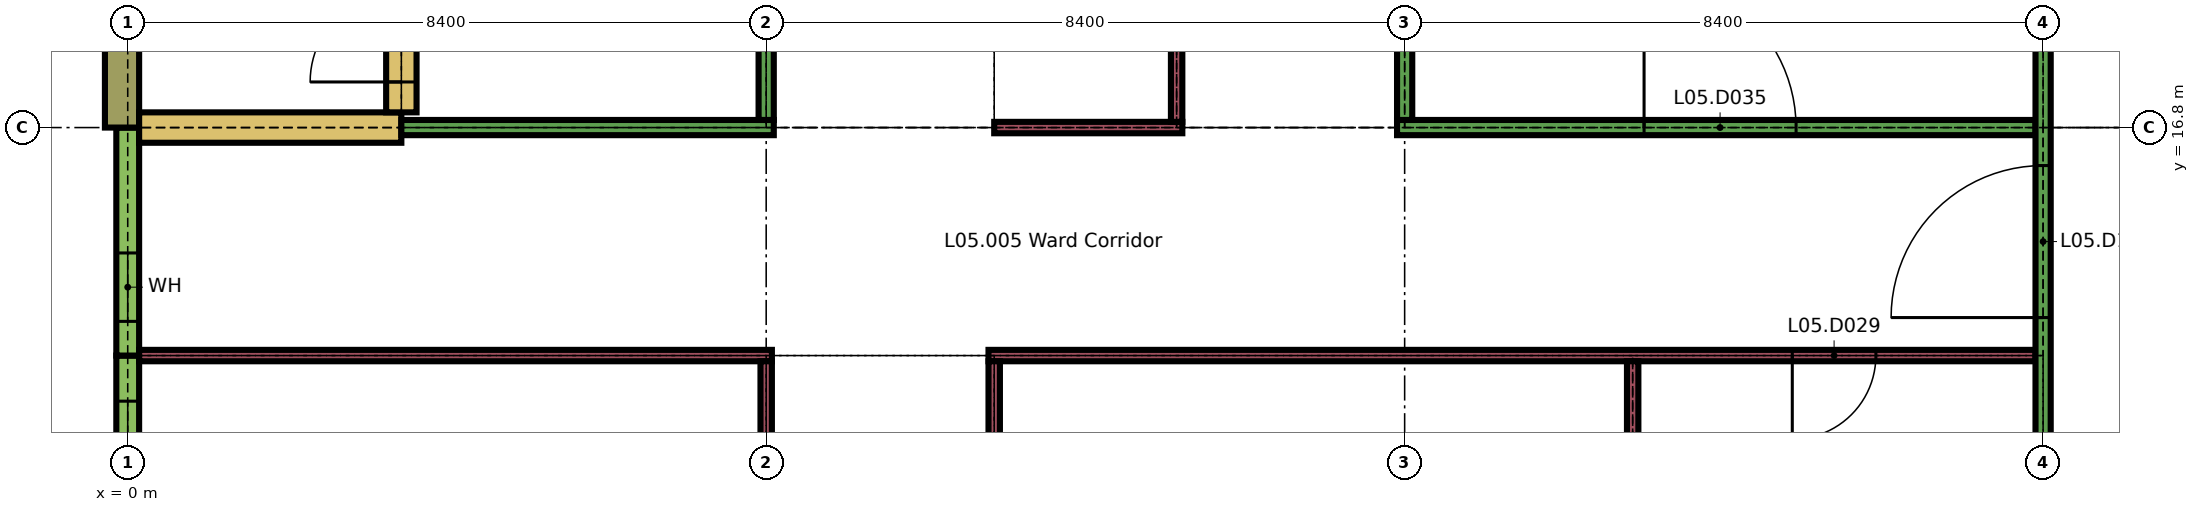
"""IFC4 building model, lengths in metres.
Left out: names, types, materials, properties, quantities, classifications, styles, units other than length and angle.
Written with IfcOpenShell. Run it as: python <this file> out.ifc"""

import sys

from ifc_helpers import new_model, si_unit, direction, frame, frame_2d, origin, place, context, subcontext, project, spatial, rectangle, extrude, element, fill, save


model = new_model("IFC4")
c1 = context("Model", 3, precision=1e-05, world=origin(), true_north=direction((0.0, 1.0)))
c2 = subcontext(c1, "Body", "Model", "MODEL_VIEW")
j1 = project(units=[si_unit("LENGTHUNIT", "METRE"), si_unit("PLANEANGLEUNIT", "RADIAN")], contexts=[c1])
p1 = place(None, origin())
s1 = spatial("IfcSite", under=j1, at=p1, CompositionType="ELEMENT")
p2 = place(p1, origin())
s2 = spatial("IfcBuilding", under=s1, at=p2, CompositionType="ELEMENT")
p3 = place(p2, frame((0.0, 0.0, 22.5)))
s3 = spatial("IfcBuildingStorey", under=s2, at=p3, CompositionType="ELEMENT", Elevation=22.5)
p4 = place(p3, frame((0.0, 11.4, 0.0), z_axis=(0.0, 0.0, 1.0), x_axis=(0.0, 1.0, 0.0)))
e1 = element("IfcWall", 1, at=p4, inside=s3, PredefinedType="SOLIDWALL", context=c2, shape_type="SweptSolid", body=[
    extrude(rectangle(XDim=2.4, YDim=0.3, at=frame_2d((1.2, 0.0))), origin(), (0.0, 0.0, 1.0), 2.96),
])
p5 = place(p4, frame((0.6, 0.0, 0.9)))
e2 = element("IfcOpeningElement", 2, at=p5, cuts=e1, PredefinedType="OPENING", context=c2, shape_type="SweptSolid", body=[
    extrude(rectangle(XDim=1.2, YDim=1.5, at=frame_2d((0.6, 0.75))), frame((0.0, 0.16, 0.0), z_axis=(0.0, -1.0, 0.0), x_axis=(1.0, 0.0, 0.0)), (0.0, 0.0, 1.0), 0.32),
])
p6 = place(p3, frame((0.0, 13.8, 0.0), z_axis=(0.0, 0.0, 1.0), x_axis=(0.0, 1.0, 0.0)))
e3 = element("IfcWall", 3, at=p6, inside=s3, PredefinedType="SOLIDWALL", context=c2, shape_type="SweptSolid", body=[
    extrude(rectangle(XDim=3.0, YDim=0.3, at=frame_2d((1.5, 0.0))), origin(), (0.0, 0.0, 1.0), 2.96),
])
p7 = place(p6, frame((0.45, 0.0, 0.9)))
e4 = element("IfcOpeningElement", 4, at=p7, cuts=e3, PredefinedType="OPENING", context=c2, shape_type="SweptSolid", body=[
    extrude(rectangle(XDim=0.9, YDim=1.5, at=frame_2d((0.45, 0.75))), frame((0.0, 0.16, 0.0), z_axis=(0.0, -1.0, 0.0), x_axis=(1.0, 0.0, 0.0)), (0.0, 0.0, 1.0), 0.32),
])
p8 = place(p3, frame((-0.075, 16.8, 0.0), z_axis=(0.0, 0.0, 1.0), x_axis=(0.0, 1.0, 0.0)))
e5 = element("IfcWall", 5, at=p8, inside=s3, PredefinedType="SOLIDWALL", context=c2, shape_type="SweptSolid", body=[
    extrude(rectangle(XDim=3.15, YDim=0.45, at=frame_2d((1.575, 0.0))), origin(), (0.0, 0.0, 1.0), 3.26),
])
p9 = place(p3, frame((0.15, 13.8, 0.0), z_axis=(0.0, 0.0, 1.0), x_axis=(1.0, 0.0, 0.0)))
e6 = element("IfcWall", 6, at=p9, inside=s3, PredefinedType="PARTITIONING", context=c2, shape_type="SweptSolid", body=[
    extrude(rectangle(XDim=8.325, YDim=0.15, at=frame_2d((4.163, 0.0))), origin(), (0.0, 0.0, 1.0), 3.26),
])
p10 = place(p3, frame((11.325, 13.8, 0.0), z_axis=(0.0, 0.0, 1.0), x_axis=(1.0, 0.0, 0.0)))
e7 = element("IfcWall", 7, at=p10, inside=s3, PredefinedType="PARTITIONING", context=c2, shape_type="SweptSolid", body=[
    extrude(rectangle(XDim=13.775, YDim=0.15, at=frame_2d((6.888, 0.0))), origin(), (0.0, 0.0, 1.0), 3.26),
])
p11 = place(p10, frame((10.575, 0.0, 0.0)))
e8 = element("IfcOpeningElement", 8, at=p11, cuts=e7, PredefinedType="OPENING", context=c2, shape_type="SweptSolid", body=[
    extrude(rectangle(XDim=1.1, YDim=2.1, at=frame_2d((0.55, 1.05))), frame((0.0, 0.085, 0.0), z_axis=(0.0, -1.0, 0.0), x_axis=(1.0, 0.0, 0.0)), (0.0, 0.0, 1.0), 0.17),
])
p12 = place(p3, frame((0.15, 16.8, 0.0), z_axis=(0.0, 0.0, 1.0), x_axis=(1.0, 0.0, 0.0)))
e9 = element("IfcWall", 9, at=p12, inside=s3, PredefinedType="SHEAR", context=c2, shape_type="SweptSolid", body=[
    extrude(rectangle(XDim=3.45, YDim=0.4, at=frame_2d((1.725, 0.0))), origin(), (0.0, 0.0, 1.0), 3.26),
])
p13 = place(p3, frame((3.6, 16.8, 0.0), z_axis=(0.0, 0.0, 1.0), x_axis=(1.0, 0.0, 0.0)))
e10 = element("IfcWall", 10, at=p13, inside=s3, PredefinedType="PARTITIONING", context=c2, shape_type="SweptSolid", body=[
    extrude(rectangle(XDim=4.9, YDim=0.2, at=frame_2d((2.45, 0.0))), origin(), (0.0, 0.0, 1.0), 3.26),
])
p14 = place(p3, frame((11.4, 16.8, 0.0), z_axis=(0.0, 0.0, 1.0), x_axis=(1.0, 0.0, 0.0)))
e11 = element("IfcWall", 11, at=p14, inside=s3, PredefinedType="PARTITIONING", context=c2, shape_type="SweptSolid", body=[
    extrude(rectangle(XDim=2.475, YDim=0.15, at=frame_2d((1.238, 0.0))), origin(), (0.0, 0.0, 1.0), 3.26),
])
p15 = place(p3, frame((16.7, 16.8, 0.0), z_axis=(0.0, 0.0, 1.0), x_axis=(1.0, 0.0, 0.0)))
e12 = element("IfcWall", 12, at=p15, inside=s3, PredefinedType="PARTITIONING", context=c2, shape_type="SweptSolid", body=[
    extrude(rectangle(XDim=8.4, YDim=0.2, at=frame_2d((4.2, 0.0))), origin(), (0.0, 0.0, 1.0), 3.26),
])
p16 = place(p15, frame((3.25, 0.0, 0.0)))
e13 = element("IfcOpeningElement", 13, at=p16, cuts=e12, PredefinedType="OPENING", context=c2, shape_type="SweptSolid", body=[
    extrude(rectangle(XDim=2.0, YDim=2.4, at=frame_2d((1.0, 1.2))), frame((0.0, 0.11, 0.0), z_axis=(0.0, -1.0, 0.0), x_axis=(1.0, 0.0, 0.0)), (0.0, 0.0, 1.0), 0.22),
])
p17 = place(p3, frame((3.6, 17.0, 0.0), z_axis=(0.0, 0.0, 1.0), x_axis=(0.0, 1.0, 0.0)))
e14 = element("IfcWall", 14, at=p17, inside=s3, PredefinedType="SHEAR", context=c2, shape_type="SweptSolid", body=[
    extrude(rectangle(XDim=8.0, YDim=0.4, at=frame_2d((4.0, 0.0))), origin(), (0.0, 0.0, 1.0), 3.26),
])
p18 = place(p17, frame((0.4, 0.0, 0.0)))
e15 = element("IfcOpeningElement", 15, at=p18, cuts=e14, PredefinedType="OPENING", context=c2, shape_type="SweptSolid", body=[
    extrude(rectangle(XDim=1.2, YDim=2.1, at=frame_2d((0.6, 1.05))), frame((0.0, 0.21, 0.0), z_axis=(0.0, -1.0, 0.0), x_axis=(1.0, 0.0, 0.0)), (0.0, 0.0, 1.0), 0.42),
])
p19 = place(p3, frame((8.4, 11.4, 0.0), z_axis=(0.0, 0.0, 1.0), x_axis=(0.0, 1.0, 0.0)))
e16 = element("IfcWall", 16, at=p19, inside=s3, PredefinedType="PARTITIONING", context=c2, shape_type="SweptSolid", body=[
    extrude(rectangle(XDim=2.325, YDim=0.15, at=frame_2d((1.163, 0.0))), origin(), (0.0, 0.0, 1.0), 3.26),
])
p20 = place(p3, frame((8.4, 16.9, 0.0), z_axis=(0.0, 0.0, 1.0), x_axis=(0.0, 1.0, 0.0)))
e17 = element("IfcWall", 17, at=p20, inside=s3, PredefinedType="PARTITIONING", context=c2, shape_type="SweptSolid", body=[
    extrude(rectangle(XDim=8.3, YDim=0.2, at=frame_2d((4.15, 0.0))), origin(), (0.0, 0.0, 1.0), 3.26),
])
p21 = place(p20, frame((3.15, 0.0, 0.0)))
e18 = element("IfcOpeningElement", 18, at=p21, cuts=e17, PredefinedType="OPENING", context=c2, shape_type="SweptSolid", body=[
    extrude(rectangle(XDim=2.0, YDim=2.4, at=frame_2d((1.0, 1.2))), frame((0.0, 0.11, 0.0), z_axis=(0.0, -1.0, 0.0), x_axis=(1.0, 0.0, 0.0)), (0.0, 0.0, 1.0), 0.22),
])
p22 = place(p3, frame((11.4, 11.4, 0.0), z_axis=(0.0, 0.0, 1.0), x_axis=(0.0, 1.0, 0.0)))
e19 = element("IfcWall", 19, at=p22, inside=s3, PredefinedType="PARTITIONING", context=c2, shape_type="SweptSolid", body=[
    extrude(rectangle(XDim=2.325, YDim=0.15, at=frame_2d((1.163, 0.0))), origin(), (0.0, 0.0, 1.0), 3.26),
])
p23 = place(p3, frame((13.8, 16.875, 0.0), z_axis=(0.0, 0.0, 1.0), x_axis=(0.0, 1.0, 0.0)))
e20 = element("IfcWall", 20, at=p23, inside=s3, PredefinedType="PARTITIONING", context=c2, shape_type="SweptSolid", body=[
    extrude(rectangle(XDim=16.625, YDim=0.15, at=frame_2d((8.312, 0.0))), origin(), (0.0, 0.0, 1.0), 3.26),
])
p24 = place(p23, frame((13.275, 0.0, 0.0)))
e21 = element("IfcOpeningElement", 21, at=p24, cuts=e20, PredefinedType="OPENING", context=c2, shape_type="SweptSolid", body=[
    extrude(rectangle(XDim=1.2, YDim=2.1, at=frame_2d((0.6, 1.05))), frame((0.0, 0.085, 0.0), z_axis=(0.0, -1.0, 0.0), x_axis=(1.0, 0.0, 0.0)), (0.0, 0.0, 1.0), 0.17),
])
p25 = place(p3, frame((16.8, 16.9, 0.0), z_axis=(0.0, 0.0, 1.0), x_axis=(0.0, 1.0, 0.0)))
e22 = element("IfcWall", 22, at=p25, inside=s3, PredefinedType="PARTITIONING", context=c2, shape_type="SweptSolid", body=[
    extrude(rectangle(XDim=4.7, YDim=0.2, at=frame_2d((2.35, 0.0))), origin(), (0.0, 0.0, 1.0), 3.26),
])
p26 = place(p3, frame((19.8, 11.475, 0.0), z_axis=(0.0, 0.0, 1.0), x_axis=(0.0, 1.0, 0.0)))
e23 = element("IfcWall", 23, at=p26, inside=s3, PredefinedType="PARTITIONING", context=c2, shape_type="SweptSolid", body=[
    extrude(rectangle(XDim=2.25, YDim=0.15, at=frame_2d((1.125, 0.0))), origin(), (0.0, 0.0, 1.0), 3.26),
])
p27 = place(p3, frame((25.2, 8.75, 0.0), z_axis=(0.0, 0.0, 1.0), x_axis=(0.0, 1.0, 0.0)))
e24 = element("IfcWall", 24, at=p27, inside=s3, PredefinedType="PARTITIONING", context=c2, shape_type="SweptSolid", body=[
    extrude(rectangle(XDim=12.85, YDim=0.2, at=frame_2d((6.425, 0.0))), origin(), (0.0, 0.0, 1.0), 3.26),
])
p28 = place(p27, frame((0.325, 0.0, 0.0)))
e25 = element("IfcOpeningElement", 25, at=p28, cuts=e24, PredefinedType="OPENING", context=c2, shape_type="SweptSolid", body=[
    extrude(rectangle(XDim=2.0, YDim=2.4, at=frame_2d((1.0, 1.2))), frame((0.0, 0.11, 0.0), z_axis=(0.0, -1.0, 0.0), x_axis=(1.0, 0.0, 0.0)), (0.0, 0.0, 1.0), 0.22),
])
p29 = place(p27, frame((5.55, 0.0, 0.0)))
e26 = element("IfcOpeningElement", 26, at=p29, cuts=e24, PredefinedType="OPENING", context=c2, shape_type="SweptSolid", body=[
    extrude(rectangle(XDim=2.0, YDim=2.4, at=frame_2d((1.0, 1.2))), frame((0.0, 0.11, 0.0), z_axis=(0.0, -1.0, 0.0), x_axis=(1.0, 0.0, 0.0)), (0.0, 0.0, 1.0), 0.22),
])
p30 = place(p5, origin())
e27 = element("IfcWindow", 27, at=p30, inside=s3, PartitioningType="SINGLE_PANEL", PredefinedType="WINDOW", context=c2, shape_type="SweptSolid", body=[
    extrude(rectangle(XDim=1.2, YDim=1.5, at=frame_2d((0.6, 0.75))), frame((0.0, 0.03, 0.0), z_axis=(0.0, -1.0, 0.0), x_axis=(1.0, 0.0, 0.0)), (0.0, 0.0, 1.0), 0.06),
])
fill(e2, e27)
p31 = place(p7, origin())
e28 = element("IfcWindow", 28, at=p31, inside=s3, PartitioningType="SINGLE_PANEL", PredefinedType="WINDOW", context=c2, shape_type="SweptSolid", body=[
    extrude(rectangle(XDim=0.9, YDim=1.5, at=frame_2d((0.45, 0.75))), frame((0.0, 0.03, 0.0), z_axis=(0.0, -1.0, 0.0), x_axis=(1.0, 0.0, 0.0)), (0.0, 0.0, 1.0), 0.06),
])
fill(e4, e28)
p32 = place(p11, origin())
e29 = element("IfcDoor", 29, at=p32, inside=s3, OperationType="SINGLE_SWING_LEFT", PredefinedType="DOOR", context=c2, shape_type="SweptSolid", body=[
    extrude(rectangle(XDim=1.1, YDim=2.1, at=frame_2d((0.55, 1.05))), frame((0.0, 0.025, 0.0), z_axis=(0.0, -1.0, 0.0), x_axis=(1.0, 0.0, 0.0)), (0.0, 0.0, 1.0), 0.05),
])
fill(e8, e29)
p33 = place(p16, origin())
e30 = element("IfcDoor", 30, at=p33, inside=s3, OperationType="SINGLE_SWING_RIGHT", PredefinedType="DOOR", context=c2, shape_type="SweptSolid", body=[
    extrude(rectangle(XDim=2.0, YDim=2.4, at=frame_2d((1.0, 1.2))), frame((0.0, 0.03, 0.0), z_axis=(0.0, -1.0, 0.0), x_axis=(1.0, 0.0, 0.0)), (0.0, 0.0, 1.0), 0.06),
])
fill(e13, e30)
p34 = place(p18, origin())
e31 = element("IfcDoor", 31, at=p34, inside=s3, OperationType="SINGLE_SWING_RIGHT", PredefinedType="DOOR", context=c2, shape_type="SweptSolid", body=[
    extrude(rectangle(XDim=1.2, YDim=2.1, at=frame_2d((0.6, 1.05))), frame((0.0, 0.025, 0.0), z_axis=(0.0, -1.0, 0.0), x_axis=(1.0, 0.0, 0.0)), (0.0, 0.0, 1.0), 0.05),
])
fill(e15, e31)
p35 = place(p29, origin())
e32 = element("IfcDoor", 32, at=p35, inside=s3, OperationType="SINGLE_SWING_RIGHT", PredefinedType="DOOR", context=c2, shape_type="SweptSolid", body=[
    extrude(rectangle(XDim=2.0, YDim=2.4, at=frame_2d((1.0, 1.2))), frame((0.0, 0.03, 0.0), z_axis=(0.0, -1.0, 0.0), x_axis=(1.0, 0.0, 0.0)), (0.0, 0.0, 1.0), 0.06),
])
fill(e26, e32)
save(model, sys.argv[1])
